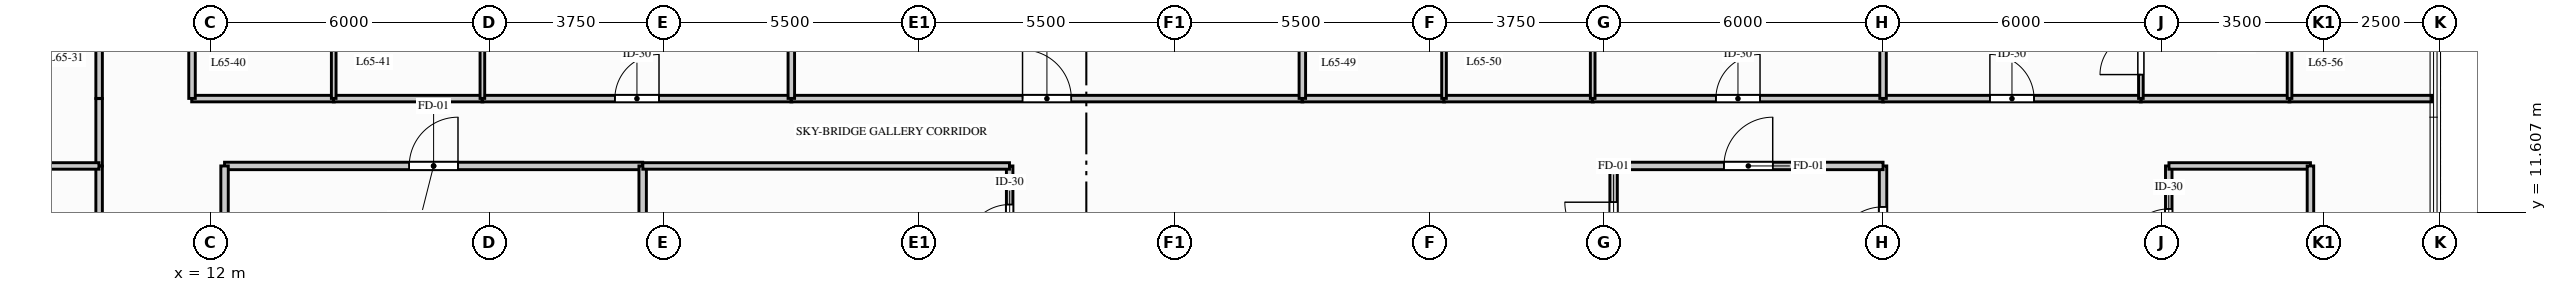
"""IFC4 building model, lengths in metres.
Left out: names, types, materials, properties, quantities, classifications, styles, units other than length and angle.
Written with IfcOpenShell. Run it as: python <this file> out.ifc"""

import sys

from ifc_helpers import new_model, si_unit, direction, frame, frame_2d, origin, place, context, subcontext, project, spatial, rectangle, extrude, element, fill, save


model = new_model("IFC4")
c1 = context("Model", 3, precision=1e-05, world=origin(), true_north=direction((0.0, 1.0)))
c2 = subcontext(c1, "Body", "Model", "MODEL_VIEW")
j1 = project(units=[si_unit("LENGTHUNIT", "METRE"), si_unit("PLANEANGLEUNIT", "RADIAN")], contexts=[c1])
p1 = place(None, origin())
s1 = spatial("IfcSite", under=j1, at=p1, CompositionType="ELEMENT")
p2 = place(p1, origin())
s2 = spatial("IfcBuilding", under=s1, at=p2, CompositionType="ELEMENT")
p3 = place(p2, frame((0.0, 0.0, 214.4)))
s3 = spatial("IfcBuildingStorey", under=s2, at=p3, CompositionType="ELEMENT", Elevation=214.4)
p4 = place(p3, frame((29.2, 9.989, 0.0), z_axis=(0.0, 0.0, 1.0), x_axis=(0.0, 1.0, 0.0)))
e1 = element("IfcWall", 1, at=p4, inside=s3, PredefinedType="PARTITIONING", context=c2, shape_type="SweptSolid", body=[
    extrude(rectangle(XDim=2.611, YDim=0.14, at=frame_2d((1.306, 0.0))), origin(), (0.0, 0.0, 1.0), 2.454),
])
p5 = place(p4, frame((0.831, 0.0, 0.0)))
e2 = element("IfcOpeningElement", 2, at=p5, cuts=e1, PredefinedType="OPENING", context=c2, shape_type="SweptSolid", body=[
    extrude(rectangle(XDim=0.95, YDim=2.05, at=frame_2d((0.475, 1.025))), frame((0.0, 0.08, 0.0), z_axis=(0.0, -1.0, 0.0), x_axis=(1.0, 0.0, 0.0)), (0.0, 0.0, 1.0), 0.16),
])
p6 = place(p3, frame((12.3, 12.6, 0.0), z_axis=(0.0, 0.0, 1.0), x_axis=(1.0, 0.0, 0.0)))
e3 = element("IfcWall", 3, at=p6, inside=s3, PredefinedType="PARTITIONING", context=c2, shape_type="SweptSolid", body=[
    extrude(rectangle(XDim=9.0, YDim=0.16, at=frame_2d((4.5, 0.0))), origin(), (0.0, 0.0, 1.0), 2.685),
])
p7 = place(p6, frame((3.975, 0.0, 0.0)))
e4 = element("IfcOpeningElement", 4, at=p7, cuts=e3, PredefinedType="OPENING", context=c2, shape_type="SweptSolid", body=[
    extrude(rectangle(XDim=1.05, YDim=2.06, at=frame_2d((0.525, 1.03))), frame((0.0, 0.09, 0.0), z_axis=(0.0, -1.0, 0.0), x_axis=(1.0, 0.0, 0.0)), (0.0, 0.0, 1.0), 0.18),
])
p8 = place(p3, frame((12.3, 9.5, 0.0), z_axis=(0.0, 0.0, 1.0), x_axis=(0.0, 1.0, 0.0)))
e5 = element("IfcWall", 5, at=p8, inside=s3, PredefinedType="PARTITIONING", context=c2, shape_type="SweptSolid", body=[
    extrude(rectangle(XDim=3.1, YDim=0.16, at=frame_2d((1.55, 0.0))), origin(), (0.0, 0.0, 1.0), 2.685),
])
p9 = place(p8, frame((1.025, 0.0, 0.0)))
e6 = element("IfcOpeningElement", 6, at=p9, cuts=e5, PredefinedType="OPENING", context=c2, shape_type="SweptSolid", body=[
    extrude(rectangle(XDim=1.05, YDim=2.06, at=frame_2d((0.525, 1.03))), frame((0.0, 0.09, 0.0), z_axis=(0.0, -1.0, 0.0), x_axis=(1.0, 0.0, 0.0)), (0.0, 0.0, 1.0), 0.18),
])
p10 = place(p3, frame((21.3, 9.989, 0.0), z_axis=(0.0, 0.0, 1.0), x_axis=(0.0, 1.0, 0.0)))
e7 = element("IfcWall", 7, at=p10, inside=s3, PredefinedType="PARTITIONING", context=c2, shape_type="SweptSolid", body=[
    extrude(rectangle(XDim=2.611, YDim=0.16, at=frame_2d((1.306, 0.0))), origin(), (0.0, 0.0, 1.0), 2.685),
])
p11 = place(p3, frame((42.2, 9.989, 0.0), z_axis=(0.0, 0.0, 1.0), x_axis=(0.0, 1.0, 0.0)))
e8 = element("IfcWall", 8, at=p11, inside=s3, PredefinedType="PARTITIONING", context=c2, shape_type="SweptSolid", body=[
    extrude(rectangle(XDim=2.611, YDim=0.16, at=frame_2d((1.306, 0.0))), origin(), (0.0, 0.0, 1.0), 2.685),
])
p12 = place(p11, frame((0.781, 0.0, 0.0)))
e9 = element("IfcOpeningElement", 9, at=p12, cuts=e8, PredefinedType="OPENING", context=c2, shape_type="SweptSolid", body=[
    extrude(rectangle(XDim=1.05, YDim=2.06, at=frame_2d((0.525, 1.03))), frame((0.0, 0.09, 0.0), z_axis=(0.0, -1.0, 0.0), x_axis=(1.0, 0.0, 0.0)), (0.0, 0.0, 1.0), 0.18),
])
p13 = place(p3, frame((48.0, 9.789, 0.0), z_axis=(0.0, 0.0, 1.0), x_axis=(0.0, 1.0, 0.0)))
e10 = element("IfcWall", 10, at=p13, inside=s3, PredefinedType="PARTITIONING", context=c2, shape_type="SweptSolid", body=[
    extrude(rectangle(XDim=2.811, YDim=0.16, at=frame_2d((1.406, 0.0))), origin(), (0.0, 0.0, 1.0), 2.685),
])
p14 = place(p13, frame((0.881, 0.0, 0.0)))
e11 = element("IfcOpeningElement", 11, at=p14, cuts=e10, PredefinedType="OPENING", context=c2, shape_type="SweptSolid", body=[
    extrude(rectangle(XDim=1.05, YDim=2.06, at=frame_2d((0.525, 1.03))), frame((0.0, 0.09, 0.0), z_axis=(0.0, -1.0, 0.0), x_axis=(1.0, 0.0, 0.0)), (0.0, 0.0, 1.0), 0.18),
])
p15 = place(p3, frame((42.2, 12.6, 0.0), z_axis=(0.0, 0.0, 1.0), x_axis=(1.0, 0.0, 0.0)))
e12 = element("IfcWall", 12, at=p15, inside=s3, PredefinedType="PARTITIONING", context=c2, shape_type="SweptSolid", body=[
    extrude(rectangle(XDim=5.8, YDim=0.16, at=frame_2d((2.9, 0.0))), origin(), (0.0, 0.0, 1.0), 2.685),
])
p16 = place(p15, frame((2.375, 0.0, 0.0)))
e13 = element("IfcOpeningElement", 13, at=p16, cuts=e12, PredefinedType="OPENING", context=c2, shape_type="SweptSolid", body=[
    extrude(rectangle(XDim=1.05, YDim=2.06, at=frame_2d((0.525, 1.03))), frame((0.0, 0.09, 0.0), z_axis=(0.0, -1.0, 0.0), x_axis=(1.0, 0.0, 0.0)), (0.0, 0.0, 1.0), 0.18),
])
p17 = place(p3, frame((54.15, 9.8, 0.0), z_axis=(0.0, 0.0, 1.0), x_axis=(0.0, 1.0, 0.0)))
e14 = element("IfcWall", 14, at=p17, inside=s3, PredefinedType="PARTITIONING", context=c2, shape_type="SweptSolid", body=[
    extrude(rectangle(XDim=2.8, YDim=0.14, at=frame_2d((1.4, 0.0))), origin(), (0.0, 0.0, 1.0), 2.685),
])
p18 = place(p17, frame((0.925, 0.0, 0.0)))
e15 = element("IfcOpeningElement", 15, at=p18, cuts=e14, PredefinedType="OPENING", context=c2, shape_type="SweptSolid", body=[
    extrude(rectangle(XDim=0.95, YDim=2.05, at=frame_2d((0.475, 1.025))), frame((0.0, 0.08, 0.0), z_axis=(0.0, -1.0, 0.0), x_axis=(1.0, 0.0, 0.0)), (0.0, 0.0, 1.0), 0.16),
])
p19 = place(p3, frame((54.154, 12.6, 0.0), z_axis=(0.0, 0.0, 1.0), x_axis=(1.0, 0.0, 0.0)))
e16 = element("IfcWall", 16, at=p19, inside=s3, PredefinedType="PARTITIONING", context=c2, shape_type="SweptSolid", body=[
    extrude(rectangle(XDim=3.046, YDim=0.14, at=frame_2d((1.523, 0.0))), origin(), (0.0, 0.0, 1.0), 2.685),
])
p20 = place(p3, frame((57.2, 7.2, 0.0), z_axis=(0.0, 0.0, 1.0), x_axis=(0.0, 1.0, 0.0)))
e17 = element("IfcWall", 17, at=p20, inside=s3, PredefinedType="PARTITIONING", context=c2, shape_type="SweptSolid", body=[
    extrude(rectangle(XDim=5.4, YDim=0.14, at=frame_2d((2.7, 0.0))), origin(), (0.0, 0.0, 1.0), 2.685),
])
p21 = place(p3, frame((9.6, 12.6, 0.0), z_axis=(0.0, 0.0, 1.0), x_axis=(0.0, 1.0, 0.0)))
e18 = element("IfcWall", 18, at=p21, inside=s3, PredefinedType="PARTITIONING", context=c2, shape_type="SweptSolid", body=[
    extrude(rectangle(XDim=1.45, YDim=0.14, at=frame_2d((0.725, 0.0))), origin(), (0.0, 0.0, 1.0), 3.33),
])
p22 = place(p3, frame((21.304, 12.6, 0.0), z_axis=(0.0, 0.0, 1.0), x_axis=(1.0, 0.0, 0.0)))
e19 = element("IfcWall", 19, at=p22, inside=s3, PredefinedType="PARTITIONING", context=c2, shape_type="SweptSolid", body=[
    extrude(rectangle(XDim=7.892, YDim=0.14, at=frame_2d((3.946, 0.0))), origin(), (0.0, 0.0, 1.0), 2.685),
])
p23 = place(p3, frame((11.593, 14.05, 0.0), z_axis=(0.0, 0.0, 1.0), x_axis=(1.0, 0.0, 0.0)))
e20 = element("IfcWall", 20, at=p23, inside=s3, PredefinedType="PARTITIONING", context=c2, shape_type="SweptSolid", body=[
    extrude(rectangle(XDim=3.069, YDim=0.14, at=frame_2d((1.534, 0.0))), origin(), (0.0, 0.0, 1.0), 2.685),
])
p24 = place(p3, frame((14.643, 14.05, 0.0), z_axis=(0.0, 0.0, 1.0), x_axis=(1.0, 0.0, 0.0)))
e21 = element("IfcWall", 21, at=p24, inside=s3, PredefinedType="PARTITIONING", context=c2, shape_type="SweptSolid", body=[
    extrude(rectangle(XDim=3.219, YDim=0.14, at=frame_2d((1.609, 0.0))), origin(), (0.0, 0.0, 1.0), 2.685),
])
p25 = place(p3, frame((17.843, 14.05, 0.0), z_axis=(0.0, 0.0, 1.0), x_axis=(1.0, 0.0, 0.0)))
e22 = element("IfcWall", 22, at=p25, inside=s3, PredefinedType="PARTITIONING", context=c2, shape_type="SweptSolid", body=[
    extrude(rectangle(XDim=6.668, YDim=0.14, at=frame_2d((3.334, 0.0))), origin(), (0.0, 0.0, 1.0), 2.685),
])
p26 = place(p25, frame((2.859, 0.0, 0.0)))
e23 = element("IfcOpeningElement", 23, at=p26, cuts=e22, PredefinedType="OPENING", context=c2, shape_type="SweptSolid", body=[
    extrude(rectangle(XDim=0.95, YDim=2.05, at=frame_2d((0.475, 1.025))), frame((0.0, 0.08, 0.0), z_axis=(0.0, -1.0, 0.0), x_axis=(1.0, 0.0, 0.0)), (0.0, 0.0, 1.0), 0.16),
])
p27 = place(p3, frame((24.493, 14.05, 0.0), z_axis=(0.0, 0.0, 1.0), x_axis=(1.0, 0.0, 0.0)))
e24 = element("IfcWall", 24, at=p27, inside=s3, PredefinedType="PARTITIONING", context=c2, shape_type="SweptSolid", body=[
    extrude(rectangle(XDim=11.019, YDim=0.14, at=frame_2d((5.509, 0.0))), origin(), (0.0, 0.0, 1.0), 2.685),
])
p28 = place(p27, frame((4.984, 0.0, 0.0)))
e25 = element("IfcOpeningElement", 25, at=p28, cuts=e24, PredefinedType="OPENING", context=c2, shape_type="SweptSolid", body=[
    extrude(rectangle(XDim=1.05, YDim=2.06, at=frame_2d((0.525, 1.03))), frame((0.0, 0.08, 0.0), z_axis=(0.0, -1.0, 0.0), x_axis=(1.0, 0.0, 0.0)), (0.0, 0.0, 1.0), 0.16),
])
p29 = place(p3, frame((35.493, 14.05, 0.0), z_axis=(0.0, 0.0, 1.0), x_axis=(1.0, 0.0, 0.0)))
e26 = element("IfcWall", 26, at=p29, inside=s3, PredefinedType="PARTITIONING", context=c2, shape_type="SweptSolid", body=[
    extrude(rectangle(XDim=3.069, YDim=0.14, at=frame_2d((1.534, 0.0))), origin(), (0.0, 0.0, 1.0), 2.685),
])
p30 = place(p3, frame((38.543, 14.05, 0.0), z_axis=(0.0, 0.0, 1.0), x_axis=(1.0, 0.0, 0.0)))
e27 = element("IfcWall", 27, at=p30, inside=s3, PredefinedType="PARTITIONING", context=c2, shape_type="SweptSolid", body=[
    extrude(rectangle(XDim=3.219, YDim=0.14, at=frame_2d((1.609, 0.0))), origin(), (0.0, 0.0, 1.0), 3.33),
])
p31 = place(p3, frame((41.743, 14.05, 0.0), z_axis=(0.0, 0.0, 1.0), x_axis=(1.0, 0.0, 0.0)))
e28 = element("IfcWall", 28, at=p31, inside=s3, PredefinedType="PARTITIONING", context=c2, shape_type="SweptSolid", body=[
    extrude(rectangle(XDim=6.269, YDim=0.14, at=frame_2d((3.134, 0.0))), origin(), (0.0, 0.0, 1.0), 2.685),
])
p32 = place(p31, frame((2.659, 0.0, 0.0)))
e29 = element("IfcOpeningElement", 29, at=p32, cuts=e28, PredefinedType="OPENING", context=c2, shape_type="SweptSolid", body=[
    extrude(rectangle(XDim=0.95, YDim=2.05, at=frame_2d((0.475, 1.025))), frame((0.0, 0.08, 0.0), z_axis=(0.0, -1.0, 0.0), x_axis=(1.0, 0.0, 0.0)), (0.0, 0.0, 1.0), 0.16),
])
p33 = place(p3, frame((56.739, 14.05, 0.0), z_axis=(0.0, 0.0, 1.0), x_axis=(1.0, 0.0, 0.0)))
e30 = element("IfcWall", 30, at=p33, inside=s3, PredefinedType="PARTITIONING", context=c2, shape_type="SweptSolid", body=[
    extrude(rectangle(XDim=3.073, YDim=0.14, at=frame_2d((1.536, 0.0))), origin(), (0.0, 0.0, 1.0), 3.33),
])
p34 = place(p3, frame((53.539, 14.05, 0.0), z_axis=(0.0, 0.0, 1.0), x_axis=(1.0, 0.0, 0.0)))
e31 = element("IfcWall", 31, at=p34, inside=s3, PredefinedType="PARTITIONING", context=c2, shape_type="SweptSolid", body=[
    extrude(rectangle(XDim=3.219, YDim=0.14, at=frame_2d((1.609, 0.0))), origin(), (0.0, 0.0, 1.0), 2.685),
])
p35 = place(p3, frame((47.993, 14.05, 0.0), z_axis=(0.0, 0.0, 1.0), x_axis=(1.0, 0.0, 0.0)))
e32 = element("IfcWall", 32, at=p35, inside=s3, PredefinedType="PARTITIONING", context=c2, shape_type="SweptSolid", body=[
    extrude(rectangle(XDim=5.565, YDim=0.14, at=frame_2d((2.782, 0.0))), origin(), (0.0, 0.0, 1.0), 2.685),
])
p36 = place(p35, frame((2.307, 0.0, 0.0)))
e33 = element("IfcOpeningElement", 33, at=p36, cuts=e32, PredefinedType="OPENING", context=c2, shape_type="SweptSolid", body=[
    extrude(rectangle(XDim=0.95, YDim=2.05, at=frame_2d((0.475, 1.025))), frame((0.0, 0.08, 0.0), z_axis=(0.0, -1.0, 0.0), x_axis=(1.0, 0.0, 0.0)), (0.0, 0.0, 1.0), 0.16),
])
p37 = place(p3, frame((9.6, 9.539, 0.0), z_axis=(0.0, 0.0, 1.0), x_axis=(0.0, 1.0, 0.0)))
e34 = element("IfcWall", 34, at=p37, inside=s3, PredefinedType="PARTITIONING", context=c2, shape_type="SweptSolid", body=[
    extrude(rectangle(XDim=3.057, YDim=0.14, at=frame_2d((1.529, 0.0))), origin(), (0.0, 0.0, 1.0), 2.685),
])
p38 = place(p3, frame((7.438, 12.6, 0.0), z_axis=(0.0, 0.0, 1.0), x_axis=(1.0, 0.0, 0.0)))
e35 = element("IfcWall", 35, at=p38, inside=s3, PredefinedType="PARTITIONING", context=c2, shape_type="SweptSolid", body=[
    extrude(rectangle(XDim=2.158, YDim=0.14, at=frame_2d((1.079, 0.0))), origin(), (0.0, 0.0, 1.0), 3.33),
])
p39 = place(p3, frame((9.6, 14.054, 0.0), z_axis=(0.0, 0.0, 1.0), x_axis=(0.0, 1.0, 0.0)))
e36 = element("IfcWall", 36, at=p39, inside=s3, PredefinedType="PARTITIONING", context=c2, shape_type="SweptSolid", body=[
    extrude(rectangle(XDim=1.607, YDim=0.14, at=frame_2d((0.804, 0.0))), origin(), (0.0, 0.0, 1.0), 3.33),
])
p40 = place(p3, frame((11.6, 14.054, 0.0), z_axis=(0.0, 0.0, 1.0), x_axis=(0.0, 1.0, 0.0)))
e37 = element("IfcWall", 37, at=p40, inside=s3, PredefinedType="PARTITIONING", context=c2, shape_type="SweptSolid", body=[
    extrude(rectangle(XDim=2.357, YDim=0.14, at=frame_2d((1.179, 0.0))), origin(), (0.0, 0.0, 1.0), 2.685),
])
for number, where, z_axis, x_axis in (
    (38, (14.65, 14.054, 0.0), (0.0, 0.0, 1.0), (0.0, 1.0, 0.0)),
    (39, (17.85, 14.054, 0.0), (0.0, 0.0, 1.0), (0.0, 1.0, 0.0)),
):
    element("IfcWall", number, at=place(p3, frame(where, z_axis=z_axis, x_axis=x_axis)), inside=s3, PredefinedType="PARTITIONING", context=c2, shape_type="SweptSolid", body=[
        extrude(rectangle(XDim=2.346, YDim=0.1, at=frame_2d((1.173, 0.0))), origin(), (0.0, 0.0, 1.0), 2.685),
    ])
p41 = place(p3, frame((24.5, 14.054, 0.0), z_axis=(0.0, 0.0, 1.0), x_axis=(0.0, 1.0, 0.0)))
e40 = element("IfcWall", 40, at=p41, inside=s3, PredefinedType="PARTITIONING", context=c2, shape_type="SweptSolid", body=[
    extrude(rectangle(XDim=2.342, YDim=0.14, at=frame_2d((1.171, 0.0))), origin(), (0.0, 0.0, 1.0), 2.454),
])
p42 = place(p3, frame((35.5, 14.054, 0.0), z_axis=(0.0, 0.0, 1.0), x_axis=(0.0, 1.0, 0.0)))
e41 = element("IfcWall", 41, at=p42, inside=s3, PredefinedType="PARTITIONING", context=c2, shape_type="SweptSolid", body=[
    extrude(rectangle(XDim=2.357, YDim=0.14, at=frame_2d((1.179, 0.0))), origin(), (0.0, 0.0, 1.0), 2.454),
])
for number, where, z_axis, x_axis in (
    (42, (38.55, 14.054, 0.0), (0.0, 0.0, 1.0), (0.0, 1.0, 0.0)),
    (43, (41.75, 14.054, 0.0), (0.0, 0.0, 1.0), (0.0, 1.0, 0.0)),
):
    element("IfcWall", number, at=place(p3, frame(where, z_axis=z_axis, x_axis=x_axis)), inside=s3, PredefinedType="PARTITIONING", context=c2, shape_type="SweptSolid", body=[
        extrude(rectangle(XDim=2.346, YDim=0.1, at=frame_2d((1.173, 0.0))), origin(), (0.0, 0.0, 1.0), 2.685),
    ])
p43 = place(p3, frame((48.0, 14.054, 0.0), z_axis=(0.0, 0.0, 1.0), x_axis=(0.0, 1.0, 0.0)))
e44 = element("IfcWall", 44, at=p43, inside=s3, PredefinedType="PARTITIONING", context=c2, shape_type="SweptSolid", body=[
    extrude(rectangle(XDim=2.342, YDim=0.14, at=frame_2d((1.171, 0.0))), origin(), (0.0, 0.0, 1.0), 2.685),
])
p44 = place(p3, frame((56.75, 14.054, 0.0), z_axis=(0.0, 0.0, 1.0), x_axis=(0.0, 1.0, 0.0)))
e45 = element("IfcWall", 45, at=p44, inside=s3, PredefinedType="PARTITIONING", context=c2, shape_type="SweptSolid", body=[
    extrude(rectangle(XDim=2.346, YDim=0.1, at=frame_2d((1.173, 0.0))), origin(), (0.0, 0.0, 1.0), 2.685),
])
p45 = place(p3, frame((53.55, 14.054, 0.0), z_axis=(0.0, 0.0, 1.0), x_axis=(0.0, 1.0, 0.0)))
e46 = element("IfcWall", 46, at=p45, inside=s3, PredefinedType="PARTITIONING", context=c2, shape_type="SweptSolid", body=[
    extrude(rectangle(XDim=2.346, YDim=0.1, at=frame_2d((1.173, 0.0))), origin(), (0.0, 0.0, 1.0), 2.685),
])
p46 = place(p45, frame((0.513, 0.0, 0.0)))
e47 = element("IfcOpeningElement", 47, at=p46, cuts=e46, PredefinedType="OPENING", context=c2, shape_type="SweptSolid", body=[
    extrude(rectangle(XDim=0.88, YDim=2.04, at=frame_2d((0.44, 1.02))), frame((0.0, 0.06, 0.0), z_axis=(0.0, -1.0, 0.0), x_axis=(1.0, 0.0, 0.0)), (0.0, 0.0, 1.0), 0.12),
])
p47 = place(p5, origin())
e48 = element("IfcDoor", 48, at=p47, inside=s3, OperationType="SINGLE_SWING_LEFT", PredefinedType="DOOR", context=c2, shape_type="SweptSolid", body=[
    extrude(rectangle(XDim=0.95, YDim=2.05, at=frame_2d((0.475, 1.025))), frame((0.0, 0.025, 0.0), z_axis=(0.0, -1.0, 0.0), x_axis=(1.0, 0.0, 0.0)), (0.0, 0.0, 1.0), 0.05),
])
fill(e2, e48)
p48 = place(p7, origin())
e49 = element("IfcDoor", 49, at=p48, inside=s3, OperationType="SINGLE_SWING_RIGHT", PredefinedType="DOOR", context=c2, shape_type="SweptSolid", body=[
    extrude(rectangle(XDim=1.05, YDim=2.06, at=frame_2d((0.525, 1.03))), frame((0.0, 0.025, 0.0), z_axis=(0.0, -1.0, 0.0), x_axis=(1.0, 0.0, 0.0)), (0.0, 0.0, 1.0), 0.05),
])
fill(e4, e49)
p49 = place(p12, origin())
e50 = element("IfcDoor", 50, at=p49, inside=s3, OperationType="SINGLE_SWING_RIGHT", PredefinedType="DOOR", context=c2, shape_type="SweptSolid", body=[
    extrude(rectangle(XDim=1.05, YDim=2.06, at=frame_2d((0.525, 1.03))), frame((0.0, 0.025, 0.0), z_axis=(0.0, -1.0, 0.0), x_axis=(1.0, 0.0, 0.0)), (0.0, 0.0, 1.0), 0.05),
])
fill(e9, e50)
p50 = place(p14, origin())
e51 = element("IfcDoor", 51, at=p50, inside=s3, OperationType="SINGLE_SWING_LEFT", PredefinedType="DOOR", context=c2, shape_type="SweptSolid", body=[
    extrude(rectangle(XDim=1.05, YDim=2.06, at=frame_2d((0.525, 1.03))), frame((0.0, 0.025, 0.0), z_axis=(0.0, -1.0, 0.0), x_axis=(1.0, 0.0, 0.0)), (0.0, 0.0, 1.0), 0.05),
])
fill(e11, e51)
p51 = place(p16, origin())
e52 = element("IfcDoor", 52, at=p51, inside=s3, OperationType="SINGLE_SWING_RIGHT", PredefinedType="DOOR", context=c2, shape_type="SweptSolid", body=[
    extrude(rectangle(XDim=1.05, YDim=2.06, at=frame_2d((0.525, 1.03))), frame((0.0, 0.025, 0.0), z_axis=(0.0, -1.0, 0.0), x_axis=(1.0, 0.0, 0.0)), (0.0, 0.0, 1.0), 0.05),
])
fill(e13, e52)
p52 = place(p18, origin())
e53 = element("IfcDoor", 53, at=p52, inside=s3, OperationType="SINGLE_SWING_LEFT", PredefinedType="DOOR", context=c2, shape_type="SweptSolid", body=[
    extrude(rectangle(XDim=0.95, YDim=2.05, at=frame_2d((0.475, 1.025))), frame((0.0, 0.025, 0.0), z_axis=(0.0, -1.0, 0.0), x_axis=(1.0, 0.0, 0.0)), (0.0, 0.0, 1.0), 0.05),
])
fill(e15, e53)
p53 = place(p26, origin())
e54 = element("IfcDoor", 54, at=p53, inside=s3, OperationType="SINGLE_SWING_RIGHT", PredefinedType="DOOR", context=c2, shape_type="SweptSolid", body=[
    extrude(rectangle(XDim=0.95, YDim=2.05, at=frame_2d((0.475, 1.025))), frame((0.0, 0.025, 0.0), z_axis=(0.0, -1.0, 0.0), x_axis=(1.0, 0.0, 0.0)), (0.0, 0.0, 1.0), 0.05),
])
fill(e23, e54)
p54 = place(p28, origin())
e55 = element("IfcDoor", 55, at=p54, inside=s3, OperationType="SINGLE_SWING_LEFT", PredefinedType="DOOR", context=c2, shape_type="SweptSolid", body=[
    extrude(rectangle(XDim=1.05, YDim=2.06, at=frame_2d((0.525, 1.03))), frame((0.0, 0.025, 0.0), z_axis=(0.0, -1.0, 0.0), x_axis=(1.0, 0.0, 0.0)), (0.0, 0.0, 1.0), 0.05),
])
fill(e25, e55)
p55 = place(p32, origin())
e56 = element("IfcDoor", 56, at=p55, inside=s3, OperationType="SINGLE_SWING_RIGHT", PredefinedType="DOOR", context=c2, shape_type="SweptSolid", body=[
    extrude(rectangle(XDim=0.95, YDim=2.05, at=frame_2d((0.475, 1.025))), frame((0.0, 0.025, 0.0), z_axis=(0.0, -1.0, 0.0), x_axis=(1.0, 0.0, 0.0)), (0.0, 0.0, 1.0), 0.05),
])
fill(e29, e56)
p56 = place(p36, origin())
e57 = element("IfcDoor", 57, at=p56, inside=s3, OperationType="SINGLE_SWING_LEFT", PredefinedType="DOOR", context=c2, shape_type="SweptSolid", body=[
    extrude(rectangle(XDim=0.95, YDim=2.05, at=frame_2d((0.475, 1.025))), frame((0.0, 0.025, 0.0), z_axis=(0.0, -1.0, 0.0), x_axis=(1.0, 0.0, 0.0)), (0.0, 0.0, 1.0), 0.05),
])
fill(e33, e57)
p57 = place(p46, origin())
e58 = element("IfcDoor", 58, at=p57, inside=s3, OperationType="SINGLE_SWING_LEFT", PredefinedType="DOOR", context=c2, shape_type="SweptSolid", body=[
    extrude(rectangle(XDim=0.88, YDim=2.04, at=frame_2d((0.44, 1.02))), frame((0.0, 0.025, 0.0), z_axis=(0.0, -1.0, 0.0), x_axis=(1.0, 0.0, 0.0)), (0.0, 0.0, 1.0), 0.05),
])
fill(e47, e58)
save(model, sys.argv[1])
